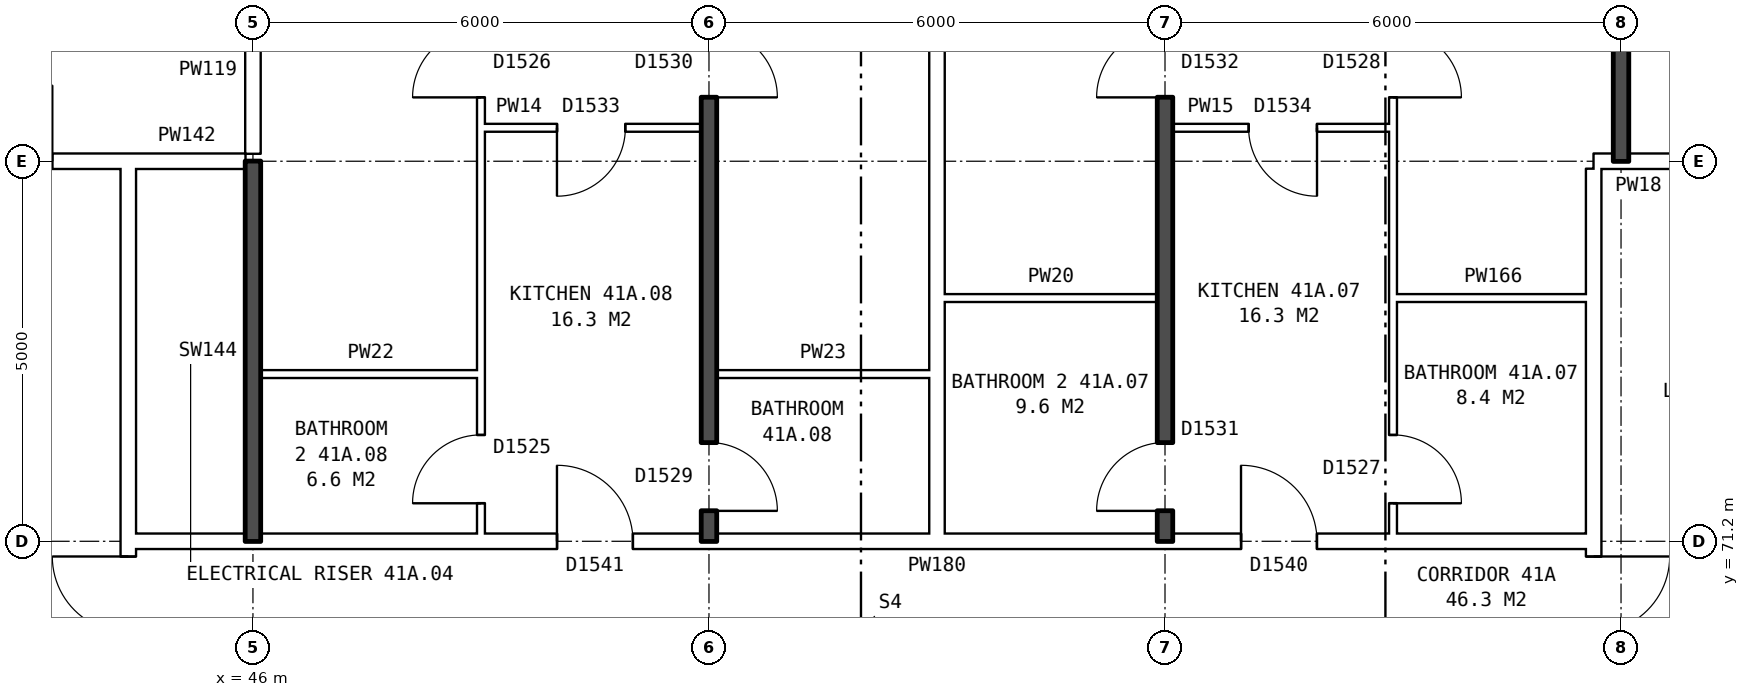
"""IFC4 building model, lengths in metres.
Left out: names, types, materials, properties, quantities, classifications, styles, units other than length and angle.
Written with IfcOpenShell. Run it as: python <this file> out.ifc"""

import sys

from ifc_helpers import new_model, si_unit, direction, frame, frame_2d, origin, place, context, subcontext, project, spatial, rectangle, extrude, element, fill, save


model = new_model("IFC4")
c1 = context("Model", 3, precision=1e-05, world=origin(), true_north=direction((0.0, 1.0)))
c2 = subcontext(c1, "Body", "Model", "MODEL_VIEW")
j1 = project(units=[si_unit("LENGTHUNIT", "METRE"), si_unit("PLANEANGLEUNIT", "RADIAN")], contexts=[c1])
p1 = place(None, origin())
s1 = spatial("IfcSite", under=j1, at=p1, CompositionType="ELEMENT")
p2 = place(p1, origin())
s2 = spatial("IfcBuilding", under=s1, at=p2, CompositionType="ELEMENT")
p3 = place(p2, frame((0.0, 0.0, 148.5)))
s3 = spatial("IfcBuildingStorey", under=s2, at=p3, CompositionType="ELEMENT", Elevation=148.5)
p4 = place(p3, frame((63.64, 63.9, 0.0), z_axis=(0.0, 0.0, 1.0), x_axis=(0.0, 1.0, 0.0)))
e1 = element("IfcWall", 1, at=p4, inside=s3, PredefinedType="PARTITIONING", context=c2, shape_type="SweptSolid", body=[
    extrude(rectangle(XDim=12.2, YDim=0.2, at=frame_2d((6.1, 0.0))), origin(), (0.0, 0.0, 1.0), 2.85),
])
p5 = place(p4, frame((5.1, 0.0, 0.0)))
e2 = element("IfcOpeningElement", 2, at=p5, cuts=e1, PredefinedType="OPENING", context=c2, shape_type="SweptSolid", body=[
    extrude(rectangle(XDim=2.0, YDim=2.1, at=frame_2d((1.0, 1.05))), frame((0.0, 0.11, 0.0), z_axis=(0.0, -1.0, 0.0), x_axis=(1.0, 0.0, 0.0)), (0.0, 0.0, 1.0), 0.22),
])
p6 = place(p3, frame((44.36, 63.9, 0.0), z_axis=(0.0, 0.0, 1.0), x_axis=(0.0, 1.0, 0.0)))
e3 = element("IfcWall", 3, at=p6, inside=s3, PredefinedType="PARTITIONING", context=c2, shape_type="SweptSolid", body=[
    extrude(rectangle(XDim=12.2, YDim=0.2, at=frame_2d((6.1, 0.0))), origin(), (0.0, 0.0, 1.0), 2.85),
])
p7 = place(p6, frame((5.1, 0.0, 0.0)))
e4 = element("IfcOpeningElement", 4, at=p7, cuts=e3, PredefinedType="OPENING", context=c2, shape_type="SweptSolid", body=[
    extrude(rectangle(XDim=2.0, YDim=2.1, at=frame_2d((1.0, 1.05))), frame((0.0, 0.11, 0.0), z_axis=(0.0, -1.0, 0.0), x_axis=(1.0, 0.0, 0.0)), (0.0, 0.0, 1.0), 0.22),
])
p8 = place(p3, frame((44.36, 71.2, 0.0), z_axis=(0.0, 0.0, 1.0), x_axis=(1.0, 0.0, 0.0)))
e5 = element("IfcWall", 5, at=p8, inside=s3, PredefinedType="PARTITIONING", context=c2, shape_type="SweptSolid", body=[
    extrude(rectangle(XDim=19.28, YDim=0.2, at=frame_2d((9.64, 0.0))), origin(), (0.0, 0.0, 1.0), 2.85),
])
p9 = place(p8, frame((14.64, 0.0, 0.0)))
e6 = element("IfcOpeningElement", 6, at=p9, cuts=e5, PredefinedType="OPENING", context=c2, shape_type="SweptSolid", body=[
    extrude(rectangle(XDim=1.0, YDim=2.1, at=frame_2d((0.5, 1.05))), frame((0.0, 0.11, 0.0), z_axis=(0.0, -1.0, 0.0), x_axis=(1.0, 0.0, 0.0)), (0.0, 0.0, 1.0), 0.22),
])
p10 = place(p8, frame((5.64, 0.0, 0.0)))
e7 = element("IfcOpeningElement", 7, at=p10, cuts=e5, PredefinedType="OPENING", context=c2, shape_type="SweptSolid", body=[
    extrude(rectangle(XDim=1.0, YDim=2.1, at=frame_2d((0.5, 1.05))), frame((0.0, 0.11, 0.0), z_axis=(0.0, -1.0, 0.0), x_axis=(1.0, 0.0, 0.0)), (0.0, 0.0, 1.0), 0.22),
])
p11 = place(p3, frame((46.1, 73.4, 0.0), z_axis=(0.0, 0.0, 1.0), x_axis=(1.0, 0.0, 0.0)))
e8 = element("IfcWall", 8, at=p11, inside=s3, PredefinedType="PARTITIONING", context=c2, shape_type="SweptSolid", body=[
    extrude(rectangle(XDim=2.9, YDim=0.1, at=frame_2d((1.45, 0.0))), origin(), (0.0, 0.0, 1.0), 2.85),
])
for number, where, z_axis, x_axis in (
    (9, (52.1, 73.4, 0.0), (0.0, 0.0, 1.0), (1.0, 0.0, 0.0)),
    (10, (55.1, 74.4, 0.0), (0.0, 0.0, 1.0), (1.0, 0.0, 0.0)),
):
    element("IfcWall", number, at=place(p3, frame(where, z_axis=z_axis, x_axis=x_axis)), inside=s3, PredefinedType="PARTITIONING", context=c2, shape_type="SweptSolid", body=[
        extrude(rectangle(XDim=2.8, YDim=0.1, at=frame_2d((1.4, 0.0))), origin(), (0.0, 0.0, 1.0), 2.85),
    ])
p12 = place(p3, frame((61.0, 74.4, 0.0), z_axis=(0.0, 0.0, 1.0), x_axis=(1.0, 0.0, 0.0)))
e11 = element("IfcWall", 11, at=p12, inside=s3, PredefinedType="PARTITIONING", context=c2, shape_type="SweptSolid", body=[
    extrude(rectangle(XDim=2.64, YDim=0.1, at=frame_2d((1.32, 0.0))), origin(), (0.0, 0.0, 1.0), 2.85),
])
p13 = place(p3, frame((41.36, 76.2, 0.0), z_axis=(0.0, 0.0, 1.0), x_axis=(1.0, 0.0, 0.0)))
e12 = element("IfcWall", 12, at=p13, inside=s3, PredefinedType="PARTITIONING", context=c2, shape_type="SweptSolid", body=[
    extrude(rectangle(XDim=3.0, YDim=0.2, at=frame_2d((1.5, 0.0))), origin(), (0.0, 0.0, 1.0), 2.85),
])
p14 = place(p13, frame((1.0, 0.0, 0.0)))
e13 = element("IfcOpeningElement", 13, at=p14, cuts=e12, PredefinedType="OPENING", context=c2, shape_type="SweptSolid", body=[
    extrude(rectangle(XDim=1.0, YDim=2.1, at=frame_2d((0.5, 1.05))), frame((0.0, 0.11, 0.0), z_axis=(0.0, -1.0, 0.0), x_axis=(1.0, 0.0, 0.0)), (0.0, 0.0, 1.0), 0.22),
])
p15 = place(p3, frame((44.36, 76.2, 0.0), z_axis=(0.0, 0.0, 1.0), x_axis=(1.0, 0.0, 0.0)))
e14 = element("IfcWall", 14, at=p15, inside=s3, PredefinedType="PARTITIONING", context=c2, shape_type="SweptSolid", body=[
    extrude(rectangle(XDim=1.54, YDim=0.2, at=frame_2d((0.77, 0.0))), origin(), (0.0, 0.0, 1.0), 2.85),
])
p16 = place(p3, frame((63.64, 76.2, 0.0), z_axis=(0.0, 0.0, 1.0), x_axis=(1.0, 0.0, 0.0)))
e15 = element("IfcWall", 15, at=p16, inside=s3, PredefinedType="PARTITIONING", context=c2, shape_type="SweptSolid", body=[
    extrude(rectangle(XDim=3.0, YDim=0.2, at=frame_2d((1.5, 0.0))), origin(), (0.0, 0.0, 1.0), 2.85),
])
p17 = place(p16, frame((1.18, 0.0, 0.0)))
e16 = element("IfcOpeningElement", 16, at=p17, cuts=e15, PredefinedType="OPENING", context=c2, shape_type="SweptSolid", body=[
    extrude(rectangle(XDim=1.0, YDim=2.1, at=frame_2d((0.5, 1.05))), frame((0.0, 0.11, 0.0), z_axis=(0.0, -1.0, 0.0), x_axis=(1.0, 0.0, 0.0)), (0.0, 0.0, 1.0), 0.22),
])
p18 = place(p3, frame((49.0, 76.64, 0.0), z_axis=(0.0, 0.0, 1.0), x_axis=(1.0, 0.0, 0.0)))
e17 = element("IfcWall", 17, at=p18, inside=s3, PredefinedType="PARTITIONING", context=c2, shape_type="SweptSolid", body=[
    extrude(rectangle(XDim=2.9, YDim=0.1, at=frame_2d((1.45, 0.0))), origin(), (0.0, 0.0, 1.0), 2.85),
])
p19 = place(p18, frame((1.0, 0.0, 0.0)))
e18 = element("IfcOpeningElement", 18, at=p19, cuts=e17, PredefinedType="OPENING", context=c2, shape_type="SweptSolid", body=[
    extrude(rectangle(XDim=0.9, YDim=2.1, at=frame_2d((0.45, 1.05))), frame((0.0, 0.06, 0.0), z_axis=(0.0, -1.0, 0.0), x_axis=(1.0, 0.0, 0.0)), (0.0, 0.0, 1.0), 0.12),
])
p20 = place(p3, frame((58.1, 76.64, 0.0), z_axis=(0.0, 0.0, 1.0), x_axis=(1.0, 0.0, 0.0)))
e19 = element("IfcWall", 19, at=p20, inside=s3, PredefinedType="PARTITIONING", context=c2, shape_type="SweptSolid", body=[
    extrude(rectangle(XDim=2.9, YDim=0.1, at=frame_2d((1.45, 0.0))), origin(), (0.0, 0.0, 1.0), 2.85),
])
p21 = place(p20, frame((1.0, 0.0, 0.0)))
e20 = element("IfcOpeningElement", 20, at=p21, cuts=e19, PredefinedType="OPENING", context=c2, shape_type="SweptSolid", body=[
    extrude(rectangle(XDim=0.9, YDim=2.1, at=frame_2d((0.45, 1.05))), frame((0.0, 0.06, 0.0), z_axis=(0.0, -1.0, 0.0), x_axis=(1.0, 0.0, 0.0)), (0.0, 0.0, 1.0), 0.12),
])
p22 = place(p3, frame((46.0, 71.2, 0.0), z_axis=(0.0, 0.0, 1.0), x_axis=(0.0, 1.0, 0.0)))
e21 = element("IfcWall", 21, at=p22, inside=s3, PredefinedType="SOLIDWALL", context=c2, shape_type="SweptSolid", body=[
    extrude(rectangle(XDim=5.0, YDim=0.2, at=frame_2d((2.5, 0.0))), origin(), (0.0, 0.0, 1.0), 2.85),
])
p23 = place(p3, frame((46.0, 76.3, 0.0), z_axis=(0.0, 0.0, 1.0), x_axis=(0.0, 1.0, 0.0)))
e22 = element("IfcWall", 22, at=p23, inside=s3, PredefinedType="PARTITIONING", context=c2, shape_type="SweptSolid", body=[
    extrude(rectangle(XDim=2.2, YDim=0.2, at=frame_2d((1.1, 0.0))), origin(), (0.0, 0.0, 1.0), 2.85),
])
p24 = place(p3, frame((49.0, 71.3, 0.0), z_axis=(0.0, 0.0, 1.0), x_axis=(0.0, 1.0, 0.0)))
e23 = element("IfcWall", 23, at=p24, inside=s3, PredefinedType="PARTITIONING", context=c2, shape_type="SweptSolid", body=[
    extrude(rectangle(XDim=14.34, YDim=0.1, at=frame_2d((7.17, 0.0))), origin(), (0.0, 0.0, 1.0), 2.85),
])
p25 = place(p24, frame((5.74, 0.0, 0.0)))
e24 = element("IfcOpeningElement", 24, at=p25, cuts=e23, PredefinedType="OPENING", context=c2, shape_type="SweptSolid", body=[
    extrude(rectangle(XDim=0.9, YDim=2.1, at=frame_2d((0.45, 1.05))), frame((0.0, 0.06, 0.0), z_axis=(0.0, -1.0, 0.0), x_axis=(1.0, 0.0, 0.0)), (0.0, 0.0, 1.0), 0.12),
])
p26 = place(p24, frame((0.4, 0.0, 0.0)))
e25 = element("IfcOpeningElement", 25, at=p26, cuts=e23, PredefinedType="OPENING", context=c2, shape_type="SweptSolid", body=[
    extrude(rectangle(XDim=0.9, YDim=2.1, at=frame_2d((0.45, 1.05))), frame((0.0, 0.06, 0.0), z_axis=(0.0, -1.0, 0.0), x_axis=(1.0, 0.0, 0.0)), (0.0, 0.0, 1.0), 0.12),
])
p27 = place(p3, frame((52.0, 71.2, 0.0), z_axis=(0.0, 0.0, 1.0), x_axis=(0.0, 1.0, 0.0)))
e26 = element("IfcWall", 26, at=p27, inside=s3, PredefinedType="SOLIDWALL", context=c2, shape_type="SweptSolid", body=[
    extrude(rectangle(XDim=14.44, YDim=0.2, at=frame_2d((7.22, 0.0))), origin(), (0.0, 0.0, 1.0), 2.85),
])
p28 = place(p27, frame((5.84, 0.0, 0.0)))
e27 = element("IfcOpeningElement", 27, at=p28, cuts=e26, PredefinedType="OPENING", context=c2, shape_type="SweptSolid", body=[
    extrude(rectangle(XDim=0.9, YDim=2.1, at=frame_2d((0.45, 1.05))), frame((0.0, 0.11, 0.0), z_axis=(0.0, -1.0, 0.0), x_axis=(1.0, 0.0, 0.0)), (0.0, 0.0, 1.0), 0.22),
])
p29 = place(p27, frame((0.4, 0.0, 0.0)))
e28 = element("IfcOpeningElement", 28, at=p29, cuts=e26, PredefinedType="OPENING", context=c2, shape_type="SweptSolid", body=[
    extrude(rectangle(XDim=0.9, YDim=2.1, at=frame_2d((0.45, 1.05))), frame((0.0, 0.11, 0.0), z_axis=(0.0, -1.0, 0.0), x_axis=(1.0, 0.0, 0.0)), (0.0, 0.0, 1.0), 0.22),
])
p30 = place(p3, frame((55.0, 71.3, 0.0), z_axis=(0.0, 0.0, 1.0), x_axis=(0.0, 1.0, 0.0)))
e29 = element("IfcWall", 29, at=p30, inside=s3, PredefinedType="PARTITIONING", context=c2, shape_type="SweptSolid", body=[
    extrude(rectangle(XDim=14.34, YDim=0.2, at=frame_2d((7.17, 0.0))), origin(), (0.0, 0.0, 1.0), 2.85),
])
p31 = place(p3, frame((58.0, 71.2, 0.0), z_axis=(0.0, 0.0, 1.0), x_axis=(0.0, 1.0, 0.0)))
e30 = element("IfcWall", 30, at=p31, inside=s3, PredefinedType="SOLIDWALL", context=c2, shape_type="SweptSolid", body=[
    extrude(rectangle(XDim=14.44, YDim=0.2, at=frame_2d((7.22, 0.0))), origin(), (0.0, 0.0, 1.0), 2.85),
])
p32 = place(p31, frame((5.84, 0.0, 0.0)))
e31 = element("IfcOpeningElement", 31, at=p32, cuts=e30, PredefinedType="OPENING", context=c2, shape_type="SweptSolid", body=[
    extrude(rectangle(XDim=0.9, YDim=2.1, at=frame_2d((0.45, 1.05))), frame((0.0, 0.11, 0.0), z_axis=(0.0, -1.0, 0.0), x_axis=(1.0, 0.0, 0.0)), (0.0, 0.0, 1.0), 0.22),
])
p33 = place(p31, frame((0.4, 0.0, 0.0)))
e32 = element("IfcOpeningElement", 32, at=p33, cuts=e30, PredefinedType="OPENING", context=c2, shape_type="SweptSolid", body=[
    extrude(rectangle(XDim=0.9, YDim=2.1, at=frame_2d((0.45, 1.05))), frame((0.0, 0.11, 0.0), z_axis=(0.0, -1.0, 0.0), x_axis=(1.0, 0.0, 0.0)), (0.0, 0.0, 1.0), 0.22),
])
p34 = place(p3, frame((61.0, 71.3, 0.0), z_axis=(0.0, 0.0, 1.0), x_axis=(0.0, 1.0, 0.0)))
e33 = element("IfcWall", 33, at=p34, inside=s3, PredefinedType="PARTITIONING", context=c2, shape_type="SweptSolid", body=[
    extrude(rectangle(XDim=14.34, YDim=0.1, at=frame_2d((7.17, 0.0))), origin(), (0.0, 0.0, 1.0), 2.85),
])
p35 = place(p34, frame((5.74, 0.0, 0.0)))
e34 = element("IfcOpeningElement", 34, at=p35, cuts=e33, PredefinedType="OPENING", context=c2, shape_type="SweptSolid", body=[
    extrude(rectangle(XDim=0.9, YDim=2.1, at=frame_2d((0.45, 1.05))), frame((0.0, 0.06, 0.0), z_axis=(0.0, -1.0, 0.0), x_axis=(1.0, 0.0, 0.0)), (0.0, 0.0, 1.0), 0.12),
])
p36 = place(p34, frame((0.4, 0.0, 0.0)))
e35 = element("IfcOpeningElement", 35, at=p36, cuts=e33, PredefinedType="OPENING", context=c2, shape_type="SweptSolid", body=[
    extrude(rectangle(XDim=0.9, YDim=2.1, at=frame_2d((0.45, 1.05))), frame((0.0, 0.06, 0.0), z_axis=(0.0, -1.0, 0.0), x_axis=(1.0, 0.0, 0.0)), (0.0, 0.0, 1.0), 0.12),
])
p37 = place(p3, frame((64.0, 76.2, 0.0), z_axis=(0.0, 0.0, 1.0), x_axis=(0.0, 1.0, 0.0)))
e36 = element("IfcWall", 36, at=p37, inside=s3, PredefinedType="SOLIDWALL", context=c2, shape_type="SweptSolid", body=[
    extrude(rectangle(XDim=9.44, YDim=0.2, at=frame_2d((4.72, 0.0))), origin(), (0.0, 0.0, 1.0), 2.85),
])
p38 = place(p5, frame((2.0, 0.0, 0.0), z_axis=(0.0, 0.0, 1.0), x_axis=(-1.0, 0.0, 0.0)))
e37 = element("IfcDoor", 37, at=p38, inside=s3, OperationType="DOUBLE_DOOR_SINGLE_SWING", PredefinedType="DOOR", context=c2, shape_type="SweptSolid", body=[
    extrude(rectangle(XDim=2.0, YDim=2.1, at=frame_2d((1.0, 1.05))), frame((0.0, 0.025, 0.0), z_axis=(0.0, -1.0, 0.0), x_axis=(1.0, 0.0, 0.0)), (0.0, 0.0, 1.0), 0.05),
])
fill(e2, e37)
p39 = place(p7, origin())
e38 = element("IfcDoor", 38, at=p39, inside=s3, OperationType="DOUBLE_DOOR_SINGLE_SWING", PredefinedType="DOOR", context=c2, shape_type="SweptSolid", body=[
    extrude(rectangle(XDim=2.0, YDim=2.1, at=frame_2d((1.0, 1.05))), frame((0.0, 0.025, 0.0), z_axis=(0.0, -1.0, 0.0), x_axis=(1.0, 0.0, 0.0)), (0.0, 0.0, 1.0), 0.05),
])
fill(e4, e38)
p40 = place(p35, frame((0.9, 0.0, 0.0), z_axis=(0.0, 0.0, 1.0), x_axis=(-1.0, 0.0, 0.0)))
e39 = element("IfcDoor", 39, at=p40, inside=s3, OperationType="SINGLE_SWING_RIGHT", PredefinedType="DOOR", context=c2, shape_type="SweptSolid", body=[
    extrude(rectangle(XDim=0.9, YDim=2.1, at=frame_2d((0.45, 1.05))), frame((0.0, 0.025, 0.0), z_axis=(0.0, -1.0, 0.0), x_axis=(1.0, 0.0, 0.0)), (0.0, 0.0, 1.0), 0.05),
])
fill(e34, e39)
p41 = place(p32, origin())
e40 = element("IfcDoor", 40, at=p41, inside=s3, OperationType="SINGLE_SWING_LEFT", PredefinedType="DOOR", context=c2, shape_type="SweptSolid", body=[
    extrude(rectangle(XDim=0.9, YDim=2.1, at=frame_2d((0.45, 1.05))), frame((0.0, 0.025, 0.0), z_axis=(0.0, -1.0, 0.0), x_axis=(1.0, 0.0, 0.0)), (0.0, 0.0, 1.0), 0.05),
])
fill(e31, e40)
p42 = place(p9, origin())
e41 = element("IfcDoor", 41, at=p42, inside=s3, OperationType="SINGLE_SWING_LEFT", PredefinedType="DOOR", context=c2, shape_type="SweptSolid", body=[
    extrude(rectangle(XDim=1.0, YDim=2.1, at=frame_2d((0.5, 1.05))), frame((0.0, 0.025, 0.0), z_axis=(0.0, -1.0, 0.0), x_axis=(1.0, 0.0, 0.0)), (0.0, 0.0, 1.0), 0.05),
])
fill(e6, e41)
p43 = place(p21, frame((0.9, 0.0, 0.0), z_axis=(0.0, 0.0, 1.0), x_axis=(-1.0, 0.0, 0.0)))
e42 = element("IfcDoor", 42, at=p43, inside=s3, OperationType="SINGLE_SWING_LEFT", PredefinedType="DOOR", context=c2, shape_type="SweptSolid", body=[
    extrude(rectangle(XDim=0.9, YDim=2.1, at=frame_2d((0.45, 1.05))), frame((0.0, 0.025, 0.0), z_axis=(0.0, -1.0, 0.0), x_axis=(1.0, 0.0, 0.0)), (0.0, 0.0, 1.0), 0.05),
])
fill(e20, e42)
p44 = place(p36, frame((0.9, 0.0, 0.0), z_axis=(0.0, 0.0, 1.0), x_axis=(-1.0, 0.0, 0.0)))
e43 = element("IfcDoor", 43, at=p44, inside=s3, OperationType="SINGLE_SWING_RIGHT", PredefinedType="DOOR", context=c2, shape_type="SweptSolid", body=[
    extrude(rectangle(XDim=0.9, YDim=2.1, at=frame_2d((0.45, 1.05))), frame((0.0, 0.025, 0.0), z_axis=(0.0, -1.0, 0.0), x_axis=(1.0, 0.0, 0.0)), (0.0, 0.0, 1.0), 0.05),
])
fill(e35, e43)
p45 = place(p33, origin())
e44 = element("IfcDoor", 44, at=p45, inside=s3, OperationType="SINGLE_SWING_LEFT", PredefinedType="DOOR", context=c2, shape_type="SweptSolid", body=[
    extrude(rectangle(XDim=0.9, YDim=2.1, at=frame_2d((0.45, 1.05))), frame((0.0, 0.025, 0.0), z_axis=(0.0, -1.0, 0.0), x_axis=(1.0, 0.0, 0.0)), (0.0, 0.0, 1.0), 0.05),
])
fill(e32, e44)
p46 = place(p28, frame((0.9, 0.0, 0.0), z_axis=(0.0, 0.0, 1.0), x_axis=(-1.0, 0.0, 0.0)))
e45 = element("IfcDoor", 45, at=p46, inside=s3, OperationType="SINGLE_SWING_RIGHT", PredefinedType="DOOR", context=c2, shape_type="SweptSolid", body=[
    extrude(rectangle(XDim=0.9, YDim=2.1, at=frame_2d((0.45, 1.05))), frame((0.0, 0.025, 0.0), z_axis=(0.0, -1.0, 0.0), x_axis=(1.0, 0.0, 0.0)), (0.0, 0.0, 1.0), 0.05),
])
fill(e27, e45)
p47 = place(p25, origin())
e46 = element("IfcDoor", 46, at=p47, inside=s3, OperationType="SINGLE_SWING_LEFT", PredefinedType="DOOR", context=c2, shape_type="SweptSolid", body=[
    extrude(rectangle(XDim=0.9, YDim=2.1, at=frame_2d((0.45, 1.05))), frame((0.0, 0.025, 0.0), z_axis=(0.0, -1.0, 0.0), x_axis=(1.0, 0.0, 0.0)), (0.0, 0.0, 1.0), 0.05),
])
fill(e24, e46)
p48 = place(p10, origin())
e47 = element("IfcDoor", 47, at=p48, inside=s3, OperationType="SINGLE_SWING_LEFT", PredefinedType="DOOR", context=c2, shape_type="SweptSolid", body=[
    extrude(rectangle(XDim=1.0, YDim=2.1, at=frame_2d((0.5, 1.05))), frame((0.0, 0.025, 0.0), z_axis=(0.0, -1.0, 0.0), x_axis=(1.0, 0.0, 0.0)), (0.0, 0.0, 1.0), 0.05),
])
fill(e7, e47)
p49 = place(p19, frame((0.9, 0.0, 0.0), z_axis=(0.0, 0.0, 1.0), x_axis=(-1.0, 0.0, 0.0)))
e48 = element("IfcDoor", 48, at=p49, inside=s3, OperationType="SINGLE_SWING_RIGHT", PredefinedType="DOOR", context=c2, shape_type="SweptSolid", body=[
    extrude(rectangle(XDim=0.9, YDim=2.1, at=frame_2d((0.45, 1.05))), frame((0.0, 0.025, 0.0), z_axis=(0.0, -1.0, 0.0), x_axis=(1.0, 0.0, 0.0)), (0.0, 0.0, 1.0), 0.05),
])
fill(e18, e48)
p50 = place(p29, frame((0.9, 0.0, 0.0), z_axis=(0.0, 0.0, 1.0), x_axis=(-1.0, 0.0, 0.0)))
e49 = element("IfcDoor", 49, at=p50, inside=s3, OperationType="SINGLE_SWING_RIGHT", PredefinedType="DOOR", context=c2, shape_type="SweptSolid", body=[
    extrude(rectangle(XDim=0.9, YDim=2.1, at=frame_2d((0.45, 1.05))), frame((0.0, 0.025, 0.0), z_axis=(0.0, -1.0, 0.0), x_axis=(1.0, 0.0, 0.0)), (0.0, 0.0, 1.0), 0.05),
])
fill(e28, e49)
p51 = place(p26, origin())
e50 = element("IfcDoor", 50, at=p51, inside=s3, OperationType="SINGLE_SWING_LEFT", PredefinedType="DOOR", context=c2, shape_type="SweptSolid", body=[
    extrude(rectangle(XDim=0.9, YDim=2.1, at=frame_2d((0.45, 1.05))), frame((0.0, 0.025, 0.0), z_axis=(0.0, -1.0, 0.0), x_axis=(1.0, 0.0, 0.0)), (0.0, 0.0, 1.0), 0.05),
])
fill(e25, e50)
save(model, sys.argv[1])
